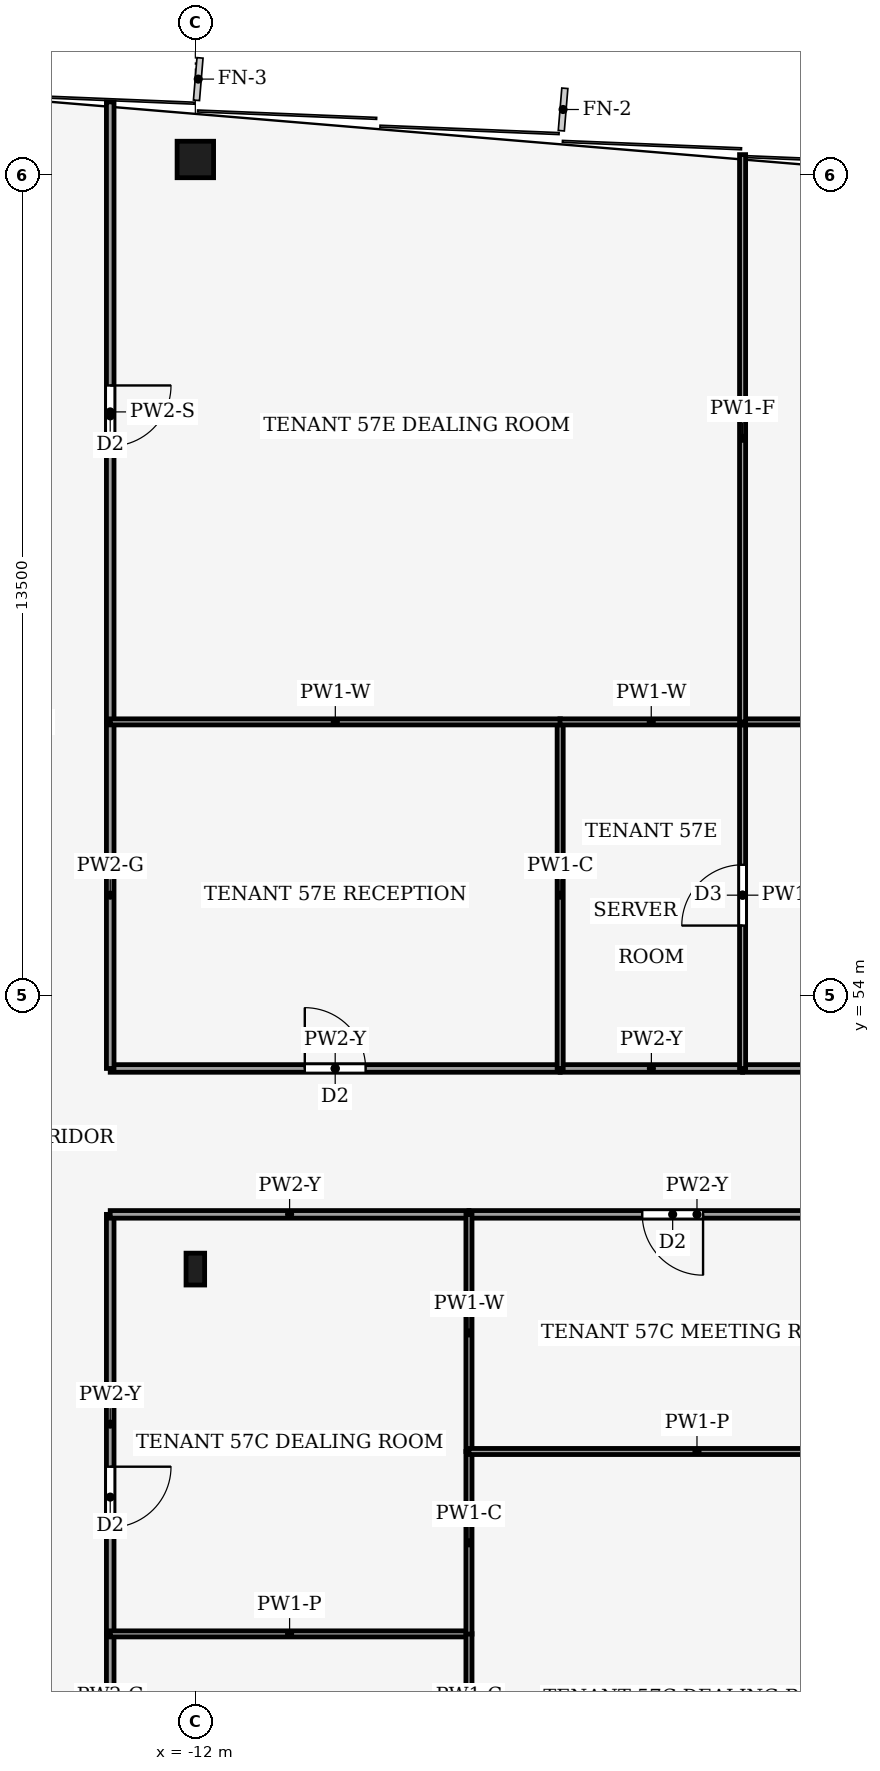
"""IFC4 building model, lengths in metres.
Left out: names, types, materials, properties, quantities, classifications, styles, units other than length and angle.
Written with IfcOpenShell. Run it as: python <this file> out.ifc"""

import sys

from ifc_helpers import new_model, si_unit, direction, frame, frame_2d, origin, origin_2d, place, context, subcontext, project, spatial, rectangle, hollow_rectangle, i_section, extrude, element, fill, save


model = new_model("IFC4")
c1 = context("Model", 3, precision=1e-05, world=origin(), true_north=direction((0.0, 1.0)))
c2 = subcontext(c1, "Body", "Model", "MODEL_VIEW")
j1 = project(units=[si_unit("LENGTHUNIT", "METRE"), si_unit("PLANEANGLEUNIT", "RADIAN")], contexts=[c1])
p1 = place(None, origin())
s1 = spatial("IfcSite", under=j1, at=p1, CompositionType="ELEMENT")
p2 = place(p1, origin())
s2 = spatial("IfcBuilding", under=s1, at=p2, CompositionType="ELEMENT")
p3 = place(p2, frame((0.0, 0.0, 250.0)))
s3 = spatial("IfcBuildingStorey", under=s2, at=p3, CompositionType="ELEMENT", Elevation=250.0)
p4 = place(p3, frame((-12.0, 67.75, 0.0), z_axis=(0.0, 0.0, 1.0), x_axis=(1.0, 0.0, 0.0)))
e1 = element("IfcColumn", 1, at=p4, inside=s3, PredefinedType="COLUMN", context=c2, shape_type="SweptSolid", body=[
    extrude(hollow_rectangle(XDim=0.6, YDim=0.6, WallThickness=0.025, at=origin_2d()), origin(), (0.0, 0.0, 1.0), 4.0),
])
p5 = place(p3, frame((-12.0, 49.5, 0.0), z_axis=(0.0, 0.0, 1.0), x_axis=(1.0, 0.0, 0.0)))
e2 = element("IfcColumn", 2, at=p5, inside=s3, PredefinedType="COLUMN", context=c2, shape_type="SweptSolid", body=[
    extrude(i_section(OverallWidth=0.306, OverallDepth=0.524, WebThickness=0.012, FlangeThickness=0.04, FilletRadius=0.027, at=origin_2d()), origin(), (0.0, 0.0, 1.0), 4.0),
])
p6 = place(p3, frame((-13.4, 40.5, 0.0), z_axis=(0.0, 0.0, 1.0), x_axis=(0.0, 1.0, 0.0)))
e3 = element("IfcWall", 3, at=p6, inside=s3, PredefinedType="PARTITIONING", context=c2, shape_type="SweptSolid", body=[
    extrude(rectangle(XDim=3.0, YDim=0.125, at=frame_2d((1.5, 0.0))), origin(), (0.0, 0.0, 1.0), 3.87),
])
p7 = place(p3, frame((-13.4, 50.4, 0.0), z_axis=(0.0, 0.0, 1.0), x_axis=(0.0, -1.0, 0.0)))
e4 = element("IfcWall", 4, at=p7, inside=s3, PredefinedType="PARTITIONING", context=c2, shape_type="SweptSolid", body=[
    extrude(rectangle(XDim=6.9, YDim=0.125, at=frame_2d((3.45, 0.0))), origin(), (0.0, 0.0, 1.0), 3.24),
])
p8 = place(p7, frame((4.15, 0.0, 0.0)))
e5 = element("IfcOpeningElement", 5, at=p8, cuts=e4, PredefinedType="OPENING", context=c2, shape_type="SweptSolid", body=[
    extrude(rectangle(XDim=1.0, YDim=2.1, at=frame_2d((0.5, 1.05))), frame((0.0, 0.073, 0.0), z_axis=(0.0, -1.0, 0.0), x_axis=(1.0, 0.0, 0.0)), (0.0, 0.0, 1.0), 0.145),
])
p9 = place(p3, frame((-7.5, 50.4, 0.0), z_axis=(0.0, 0.0, 1.0), x_axis=(-1.0, 0.0, 0.0)))
e6 = element("IfcWall", 6, at=p9, inside=s3, PredefinedType="PARTITIONING", context=c2, shape_type="SweptSolid", body=[
    extrude(rectangle(XDim=5.9, YDim=0.125, at=frame_2d((2.95, 0.0))), origin(), (0.0, 0.0, 1.0), 3.24),
])
p10 = place(p3, frame((0.0, 50.4, 0.0), z_axis=(0.0, 0.0, 1.0), x_axis=(-1.0, 0.0, 0.0)))
e7 = element("IfcWall", 7, at=p10, inside=s3, PredefinedType="PARTITIONING", context=c2, shape_type="SweptSolid", body=[
    extrude(rectangle(XDim=7.5, YDim=0.125, at=frame_2d((3.75, 0.0))), origin(), (0.0, 0.0, 1.0), 3.24),
])
p11 = place(p10, frame((3.65, 0.0, 0.0)))
e8 = element("IfcOpeningElement", 8, at=p11, cuts=e7, PredefinedType="OPENING", context=c2, shape_type="SweptSolid", body=[
    extrude(rectangle(XDim=1.0, YDim=2.1, at=frame_2d((0.5, 1.05))), frame((0.0, 0.073, 0.0), z_axis=(0.0, -1.0, 0.0), x_axis=(1.0, 0.0, 0.0)), (0.0, 0.0, 1.0), 0.145),
])
p12 = place(p3, frame((-13.4, 52.8, 0.0), z_axis=(0.0, 0.0, 1.0), x_axis=(1.0, 0.0, 0.0)))
e9 = element("IfcWall", 9, at=p12, inside=s3, PredefinedType="PARTITIONING", context=c2, shape_type="SweptSolid", body=[
    extrude(rectangle(XDim=7.4, YDim=0.125, at=frame_2d((3.7, 0.0))), origin(), (0.0, 0.0, 1.0), 3.24),
])
p13 = place(p12, frame((3.2, 0.0, 0.0)))
e10 = element("IfcOpeningElement", 10, at=p13, cuts=e9, PredefinedType="OPENING", context=c2, shape_type="SweptSolid", body=[
    extrude(rectangle(XDim=1.0, YDim=2.1, at=frame_2d((0.5, 1.05))), frame((0.0, 0.073, 0.0), z_axis=(0.0, -1.0, 0.0), x_axis=(1.0, 0.0, 0.0)), (0.0, 0.0, 1.0), 0.145),
])
p14 = place(p3, frame((-13.4, 52.8, 0.0), z_axis=(0.0, 0.0, 1.0), x_axis=(0.0, 1.0, 0.0)))
e11 = element("IfcWall", 11, at=p14, inside=s3, PredefinedType="PARTITIONING", context=c2, shape_type="SweptSolid", body=[
    extrude(rectangle(XDim=5.7, YDim=0.125, at=frame_2d((2.85, 0.0))), origin(), (0.0, 0.0, 1.0), 3.87),
])
p15 = place(p3, frame((-3.0, 52.8, 0.0), z_axis=(0.0, 0.0, 1.0), x_axis=(-1.0, 0.0, 0.0)))
e12 = element("IfcWall", 12, at=p15, inside=s3, PredefinedType="PARTITIONING", context=c2, shape_type="SweptSolid", body=[
    extrude(rectangle(XDim=3.0, YDim=0.125, at=frame_2d((1.5, 0.0))), origin(), (0.0, 0.0, 1.0), 3.24),
])
p16 = place(p3, frame((9.0, 52.8, 0.0), z_axis=(0.0, 0.0, 1.0), x_axis=(-1.0, 0.0, 0.0)))
e13 = element("IfcWall", 13, at=p16, inside=s3, PredefinedType="PARTITIONING", context=c2, shape_type="SweptSolid", body=[
    extrude(rectangle(XDim=12.0, YDim=0.125, at=frame_2d((6.0, 0.0))), origin(), (0.0, 0.0, 1.0), 3.24),
])
p17 = place(p16, frame((2.3, 0.0, 0.0)))
e14 = element("IfcOpeningElement", 14, at=p17, cuts=e13, PredefinedType="OPENING", context=c2, shape_type="SweptSolid", body=[
    extrude(rectangle(XDim=1.0, YDim=2.1, at=frame_2d((0.5, 1.05))), frame((0.0, 0.073, 0.0), z_axis=(0.0, -1.0, 0.0), x_axis=(1.0, 0.0, 0.0)), (0.0, 0.0, 1.0), 0.145),
])
p18 = place(p3, frame((-13.4, 68.697, 0.0), z_axis=(0.0, 0.0, 1.0), x_axis=(0.0, -1.0, 0.0)))
e15 = element("IfcWall", 15, at=p18, inside=s3, PredefinedType="PARTITIONING", context=c2, shape_type="SweptSolid", body=[
    extrude(rectangle(XDim=10.197, YDim=0.125, at=frame_2d((5.098, 0.0))), origin(), (0.0, 0.0, 1.0), 3.04),
])
p19 = place(p18, frame((4.663, 0.0, 0.0)))
e16 = element("IfcOpeningElement", 16, at=p19, cuts=e15, PredefinedType="OPENING", context=c2, shape_type="SweptSolid", body=[
    extrude(rectangle(XDim=1.0, YDim=2.1, at=frame_2d((0.5, 1.05))), frame((0.0, 0.073, 0.0), z_axis=(0.0, -1.0, 0.0), x_axis=(1.0, 0.0, 0.0)), (0.0, 0.0, 1.0), 0.145),
])
p20 = place(p3, frame((-7.5, 43.5, 0.0), z_axis=(0.0, 0.0, 1.0), x_axis=(-1.0, 0.0, 0.0)))
e17 = element("IfcWall", 17, at=p20, inside=s3, PredefinedType="PARTITIONING", context=c2, shape_type="SweptSolid", body=[
    extrude(rectangle(XDim=5.9, YDim=0.1, at=frame_2d((2.95, 0.0))), origin(), (0.0, 0.0, 1.0), 3.44),
])
p21 = place(p3, frame((-7.5, 40.496, 0.0), z_axis=(0.0, 0.0, 1.0), x_axis=(0.0, 1.0, 0.0)))
e18 = element("IfcWall", 18, at=p21, inside=s3, PredefinedType="PARTITIONING", context=c2, shape_type="SweptSolid", body=[
    extrude(rectangle(XDim=3.008, YDim=0.1, at=frame_2d((1.504, 0.0))), origin(), (0.0, 0.0, 1.0), 3.87),
])
p22 = place(p3, frame((-7.5, 43.496, 0.0), z_axis=(0.0, 0.0, 1.0), x_axis=(0.0, 1.0, 0.0)))
e19 = element("IfcWall", 19, at=p22, inside=s3, PredefinedType="PARTITIONING", context=c2, shape_type="SweptSolid", body=[
    extrude(rectangle(XDim=3.004, YDim=0.1, at=frame_2d((1.502, 0.0))), origin(), (0.0, 0.0, 1.0), 3.87),
])
p23 = place(p3, frame((-7.5, 46.5, 0.0), z_axis=(0.0, 0.0, 1.0), x_axis=(0.0, 1.0, 0.0)))
e20 = element("IfcWall", 20, at=p23, inside=s3, PredefinedType="PARTITIONING", context=c2, shape_type="SweptSolid", body=[
    extrude(rectangle(XDim=3.9, YDim=0.1, at=frame_2d((1.95, 0.0))), origin(), (0.0, 0.0, 1.0), 3.24),
])
p24 = place(p3, frame((0.0, 46.5, 0.0), z_axis=(0.0, 0.0, 1.0), x_axis=(-1.0, 0.0, 0.0)))
e21 = element("IfcWall", 21, at=p24, inside=s3, PredefinedType="PARTITIONING", context=c2, shape_type="SweptSolid", body=[
    extrude(rectangle(XDim=7.5, YDim=0.1, at=frame_2d((3.75, 0.0))), origin(), (0.0, 0.0, 1.0), 3.44),
])
p25 = place(p3, frame((-6.0, 52.8, 0.0), z_axis=(0.0, 0.0, 1.0), x_axis=(0.0, 1.0, 0.0)))
e22 = element("IfcWall", 22, at=p25, inside=s3, PredefinedType="PARTITIONING", context=c2, shape_type="SweptSolid", body=[
    extrude(rectangle(XDim=5.7, YDim=0.1, at=frame_2d((2.85, 0.0))), origin(), (0.0, 0.0, 1.0), 3.87),
])
p26 = place(p3, frame((-5.996, 58.5, 0.0), z_axis=(0.0, 0.0, 1.0), x_axis=(-1.0, 0.0, 0.0)))
e23 = element("IfcWall", 23, at=p26, inside=s3, PredefinedType="PARTITIONING", context=c2, shape_type="SweptSolid", body=[
    extrude(rectangle(XDim=7.404, YDim=0.1, at=frame_2d((3.702, 0.0))), origin(), (0.0, 0.0, 1.0), 3.24),
])
p27 = place(p3, frame((-3.0, 52.8, 0.0), z_axis=(0.0, 0.0, 1.0), x_axis=(0.0, 1.0, 0.0)))
e24 = element("IfcWall", 24, at=p27, inside=s3, PredefinedType="PARTITIONING", context=c2, shape_type="SweptSolid", body=[
    extrude(rectangle(XDim=5.7, YDim=0.1, at=frame_2d((2.85, 0.0))), origin(), (0.0, 0.0, 1.0), 3.87),
])
p28 = place(p27, frame((2.35, 0.0, 0.0)))
e25 = element("IfcOpeningElement", 25, at=p28, cuts=e24, PredefinedType="OPENING", context=c2, shape_type="SweptSolid", body=[
    extrude(rectangle(XDim=1.0, YDim=2.1, at=frame_2d((0.5, 1.05))), frame((0.0, 0.06, 0.0), z_axis=(0.0, -1.0, 0.0), x_axis=(1.0, 0.0, 0.0)), (0.0, 0.0, 1.0), 0.12),
])
p29 = place(p3, frame((-3.0, 58.5, 0.0), z_axis=(0.0, 0.0, 1.0), x_axis=(-1.0, 0.0, 0.0)))
e26 = element("IfcWall", 26, at=p29, inside=s3, PredefinedType="PARTITIONING", context=c2, shape_type="SweptSolid", body=[
    extrude(rectangle(XDim=3.004, YDim=0.1, at=frame_2d((1.502, 0.0))), origin(), (0.0, 0.0, 1.0), 3.24),
])
p30 = place(p3, frame((-3.0, 58.5, 0.0), z_axis=(0.0, 0.0, 1.0), x_axis=(1.0, 0.0, 0.0)))
e27 = element("IfcWall", 27, at=p30, inside=s3, PredefinedType="PARTITIONING", context=c2, shape_type="SweptSolid", body=[
    extrude(rectangle(XDim=9.0, YDim=0.1, at=frame_2d((4.5, 0.0))), origin(), (0.0, 0.0, 1.0), 3.24),
])
p31 = place(p30, frame((4.0, 0.0, 0.0)))
e28 = element("IfcOpeningElement", 28, at=p31, cuts=e27, PredefinedType="OPENING", context=c2, shape_type="SweptSolid", body=[
    extrude(rectangle(XDim=1.0, YDim=2.1, at=frame_2d((0.5, 1.05))), frame((0.0, 0.06, 0.0), z_axis=(0.0, -1.0, 0.0), x_axis=(1.0, 0.0, 0.0)), (0.0, 0.0, 1.0), 0.12),
])
p32 = place(p3, frame((-3.0, 58.5, 0.0), z_axis=(0.0, 0.0, 1.0), x_axis=(0.0, 1.0, 0.0)))
e29 = element("IfcWall", 29, at=p32, inside=s3, PredefinedType="PARTITIONING", context=c2, shape_type="SweptSolid", body=[
    extrude(rectangle(XDim=9.33, YDim=0.1, at=frame_2d((4.665, 0.0))), origin(), (0.0, 0.0, 1.0), 3.04),
])
p33 = place(p8, origin())
e30 = element("IfcDoor", 30, at=p33, inside=s3, OperationType="SINGLE_SWING_RIGHT", PredefinedType="DOOR", context=c2, shape_type="SweptSolid", body=[
    extrude(rectangle(XDim=1.0, YDim=2.1, at=frame_2d((0.5, 1.05))), frame((0.0, 0.025, 0.0), z_axis=(0.0, -1.0, 0.0), x_axis=(1.0, 0.0, 0.0)), (0.0, 0.0, 1.0), 0.05),
])
fill(e5, e30)
p34 = place(p11, origin())
e31 = element("IfcDoor", 31, at=p34, inside=s3, OperationType="SINGLE_SWING_RIGHT", PredefinedType="DOOR", context=c2, shape_type="SweptSolid", body=[
    extrude(rectangle(XDim=1.0, YDim=2.1, at=frame_2d((0.5, 1.05))), frame((0.0, 0.025, 0.0), z_axis=(0.0, -1.0, 0.0), x_axis=(1.0, 0.0, 0.0)), (0.0, 0.0, 1.0), 0.05),
])
fill(e8, e31)
p35 = place(p13, origin())
e32 = element("IfcDoor", 32, at=p35, inside=s3, OperationType="SINGLE_SWING_RIGHT", PredefinedType="DOOR", context=c2, shape_type="SweptSolid", body=[
    extrude(rectangle(XDim=1.0, YDim=2.1, at=frame_2d((0.5, 1.05))), frame((0.0, 0.025, 0.0), z_axis=(0.0, -1.0, 0.0), x_axis=(1.0, 0.0, 0.0)), (0.0, 0.0, 1.0), 0.05),
])
fill(e10, e32)
p36 = place(p19, origin())
e33 = element("IfcDoor", 33, at=p36, inside=s3, OperationType="SINGLE_SWING_RIGHT", PredefinedType="DOOR", context=c2, shape_type="SweptSolid", body=[
    extrude(rectangle(XDim=1.0, YDim=2.1, at=frame_2d((0.5, 1.05))), frame((0.0, 0.025, 0.0), z_axis=(0.0, -1.0, 0.0), x_axis=(1.0, 0.0, 0.0)), (0.0, 0.0, 1.0), 0.05),
])
fill(e16, e33)
p37 = place(p28, origin())
e34 = element("IfcDoor", 34, at=p37, inside=s3, OperationType="SINGLE_SWING_RIGHT", PredefinedType="DOOR", context=c2, shape_type="SweptSolid", body=[
    extrude(rectangle(XDim=1.0, YDim=2.1, at=frame_2d((0.5, 1.05))), frame((0.0, 0.025, 0.0), z_axis=(0.0, -1.0, 0.0), x_axis=(1.0, 0.0, 0.0)), (0.0, 0.0, 1.0), 0.05),
])
fill(e25, e34)
save(model, sys.argv[1])
